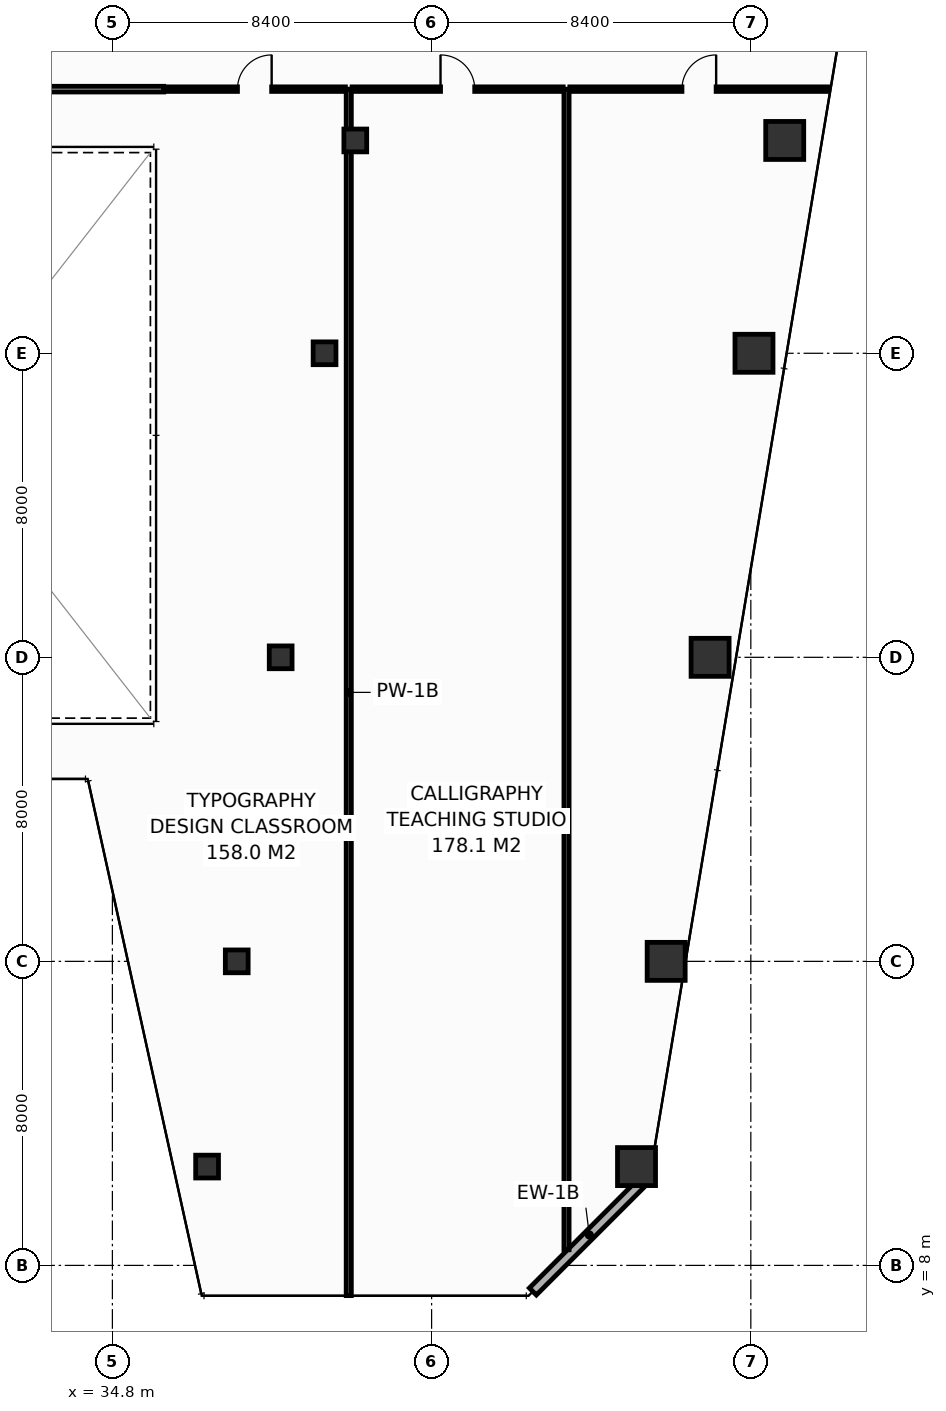
"""IFC4 building model, lengths in metres.
Left out: names, types, materials, properties, quantities, classifications, styles, units other than length and angle.
Written with IfcOpenShell. Run it as: python <this file> out.ifc"""

import sys

from ifc_helpers import new_model, si_unit, direction, frame, frame_2d, origin, origin_2d, place, context, subcontext, project, spatial, rectangle, hollow_rectangle, extrude, element, fill, save


model = new_model("IFC4")
c1 = context("Model", 3, precision=1e-05, world=origin(), true_north=direction((0.0, 1.0)))
c2 = subcontext(c1, "Body", "Model", "MODEL_VIEW")
j1 = project(units=[si_unit("LENGTHUNIT", "METRE"), si_unit("PLANEANGLEUNIT", "RADIAN")], contexts=[c1])
p1 = place(None, origin())
s1 = spatial("IfcSite", under=j1, at=p1, CompositionType="ELEMENT")
p2 = place(p1, origin())
s2 = spatial("IfcBuilding", under=s1, at=p2, CompositionType="ELEMENT")
p3 = place(p2, frame((0.0, 0.0, 133.4)))
s3 = spatial("IfcBuildingStorey", under=s2, at=p3, CompositionType="ELEMENT", Elevation=133.4)
p4 = place(p3, frame((48.592, 10.6, 0.0), z_axis=(0.0, 0.0, 1.0), x_axis=(1.0, 0.0, 0.0)))
e1 = element("IfcColumn", 1, at=p4, inside=s3, PredefinedType="COLUMN", context=c2, shape_type="SweptSolid", body=[
    extrude(hollow_rectangle(XDim=1.0, YDim=1.0, WallThickness=0.045, at=origin_2d()), origin(), (0.0, 0.0, 1.0), 3.8),
])
p5 = place(p3, frame((37.292, 10.6, 0.0), z_axis=(0.0, 0.0, 1.0), x_axis=(1.0, 0.0, 0.0)))
e2 = element("IfcColumn", 2, at=p5, inside=s3, PredefinedType="COLUMN", context=c2, shape_type="SweptSolid", body=[
    extrude(hollow_rectangle(XDim=0.6, YDim=0.6, WallThickness=0.028, at=origin_2d()), origin(), (0.0, 0.0, 1.0), 3.8),
])
p6 = place(p3, frame((49.372, 16.0, 0.0), z_axis=(0.0, 0.0, 1.0), x_axis=(1.0, 0.0, 0.0)))
e3 = element("IfcColumn", 3, at=p6, inside=s3, PredefinedType="COLUMN", context=c2, shape_type="SweptSolid", body=[
    extrude(hollow_rectangle(XDim=1.0, YDim=1.0, WallThickness=0.045, at=origin_2d()), origin(), (0.0, 0.0, 1.0), 3.8),
])
p7 = place(p3, frame((38.072, 16.0, 0.0), z_axis=(0.0, 0.0, 1.0), x_axis=(1.0, 0.0, 0.0)))
e4 = element("IfcColumn", 4, at=p7, inside=s3, PredefinedType="COLUMN", context=c2, shape_type="SweptSolid", body=[
    extrude(hollow_rectangle(XDim=0.6, YDim=0.6, WallThickness=0.028, at=origin_2d()), origin(), (0.0, 0.0, 1.0), 3.8),
])
p8 = place(p3, frame((50.528, 24.0, 0.0), z_axis=(0.0, 0.0, 1.0), x_axis=(1.0, 0.0, 0.0)))
e5 = element("IfcColumn", 5, at=p8, inside=s3, PredefinedType="COLUMN", context=c2, shape_type="SweptSolid", body=[
    extrude(hollow_rectangle(XDim=1.0, YDim=1.0, WallThickness=0.045, at=origin_2d()), origin(), (0.0, 0.0, 1.0), 3.8),
])
p9 = place(p3, frame((39.228, 24.0, 0.0), z_axis=(0.0, 0.0, 1.0), x_axis=(1.0, 0.0, 0.0)))
e6 = element("IfcColumn", 6, at=p9, inside=s3, PredefinedType="COLUMN", context=c2, shape_type="SweptSolid", body=[
    extrude(hollow_rectangle(XDim=0.6, YDim=0.6, WallThickness=0.028, at=origin_2d()), origin(), (0.0, 0.0, 1.0), 3.8),
])
p10 = place(p3, frame((51.683, 32.0, 0.0), z_axis=(0.0, 0.0, 1.0), x_axis=(1.0, 0.0, 0.0)))
e7 = element("IfcColumn", 7, at=p10, inside=s3, PredefinedType="COLUMN", context=c2, shape_type="SweptSolid", body=[
    extrude(hollow_rectangle(XDim=1.0, YDim=1.0, WallThickness=0.045, at=origin_2d()), origin(), (0.0, 0.0, 1.0), 3.8),
])
p11 = place(p3, frame((40.383, 32.0, 0.0), z_axis=(0.0, 0.0, 1.0), x_axis=(1.0, 0.0, 0.0)))
e8 = element("IfcColumn", 8, at=p11, inside=s3, PredefinedType="COLUMN", context=c2, shape_type="SweptSolid", body=[
    extrude(hollow_rectangle(XDim=0.6, YDim=0.6, WallThickness=0.028, at=origin_2d()), origin(), (0.0, 0.0, 1.0), 3.8),
])
p12 = place(p3, frame((52.492, 37.6, 0.0), z_axis=(0.0, 0.0, 1.0), x_axis=(1.0, 0.0, 0.0)))
e9 = element("IfcColumn", 9, at=p12, inside=s3, PredefinedType="COLUMN", context=c2, shape_type="SweptSolid", body=[
    extrude(hollow_rectangle(XDim=1.0, YDim=1.0, WallThickness=0.045, at=origin_2d()), origin(), (0.0, 0.0, 1.0), 3.8),
])
p13 = place(p3, frame((41.192, 37.6, 0.0), z_axis=(0.0, 0.0, 1.0), x_axis=(1.0, 0.0, 0.0)))
e10 = element("IfcColumn", 10, at=p13, inside=s3, PredefinedType="COLUMN", context=c2, shape_type="SweptSolid", body=[
    extrude(hollow_rectangle(XDim=0.6, YDim=0.6, WallThickness=0.028, at=origin_2d()), origin(), (0.0, 0.0, 1.0), 3.8),
])
p14 = place(p3, frame((45.864, 7.313, 0.0), z_axis=(0.0, 0.0, 1.0), x_axis=(0.70707775441, 0.707135806771, 0.0)))
e11 = element("IfcWall", 11, at=p14, inside=s3, PredefinedType="STANDARD", context=c2, shape_type="SweptSolid", body=[
    extrude(rectangle(XDim=4.206, YDim=0.26, at=frame_2d((2.103, 0.0))), origin(), (0.0, 0.0, 1.0), 3.55),
])
p15 = place(p3, frame((41.02, 7.205, 0.0), z_axis=(0.0, 0.0, 1.0), x_axis=(0.0, 1.0, 0.0)))
e12 = element("IfcWall", 12, at=p15, inside=s3, PredefinedType="PARTITIONING", context=c2, shape_type="SweptSolid", body=[
    extrude(rectangle(XDim=31.745, YDim=0.135, at=frame_2d((15.873, 0.0))), origin(), (0.0, 0.0, 1.0), 2.835),
])
p16 = place(p3, frame((46.75, 8.411, 0.0), z_axis=(0.0, 0.0, 1.0), x_axis=(0.0, 1.0, 0.0)))
e13 = element("IfcWall", 13, at=p16, inside=s3, PredefinedType="PARTITIONING", context=c2, shape_type="SweptSolid", body=[
    extrude(rectangle(XDim=30.539, YDim=0.135, at=frame_2d((15.27, 0.0))), origin(), (0.0, 0.0, 1.0), 2.835),
])
p17 = place(p3, frame((23.85, 38.95, 0.0), z_axis=(0.0, 0.0, 1.0), x_axis=(1.0, 0.0, 0.0)))
e14 = element("IfcWall", 14, at=p17, inside=s3, PredefinedType="PARTITIONING", context=c2, shape_type="SweptSolid", body=[
    extrude(rectangle(XDim=12.3, YDim=0.15, at=frame_2d((6.15, 0.0))), origin(), (0.0, 0.0, 1.0), 3.55),
])
p18 = place(p3, frame((36.15, 38.95, 0.0), z_axis=(0.0, 0.0, 1.0), x_axis=(1.0, 0.0, 0.0)))
e15 = element("IfcWall", 15, at=p18, inside=s3, PredefinedType="PARTITIONING", context=c2, shape_type="SweptSolid", body=[
    extrude(rectangle(XDim=4.783, YDim=0.12, at=frame_2d((2.391, 0.0))), origin(), (0.0, 0.0, 1.0), 2.835),
])
p19 = place(p18, frame((1.941, 0.0, 0.0)))
e16 = element("IfcOpeningElement", 16, at=p19, cuts=e15, PredefinedType="OPENING", context=c2, shape_type="SweptSolid", body=[
    extrude(rectangle(XDim=0.9, YDim=2.1, at=frame_2d((0.45, 1.05))), frame((0.0, 0.07, 0.0), z_axis=(0.0, -1.0, 0.0), x_axis=(1.0, 0.0, 0.0)), (0.0, 0.0, 1.0), 0.14),
])
p20 = place(p3, frame((41.107, 38.95, 0.0), z_axis=(0.0, 0.0, 1.0), x_axis=(1.0, 0.0, 0.0)))
e17 = element("IfcWall", 17, at=p20, inside=s3, PredefinedType="PARTITIONING", context=c2, shape_type="SweptSolid", body=[
    extrude(rectangle(XDim=5.555, YDim=0.12, at=frame_2d((2.778, 0.0))), origin(), (0.0, 0.0, 1.0), 3.55),
])
p21 = place(p20, frame((2.327, 0.0, 0.0)))
e18 = element("IfcOpeningElement", 18, at=p21, cuts=e17, PredefinedType="OPENING", context=c2, shape_type="SweptSolid", body=[
    extrude(rectangle(XDim=0.9, YDim=2.1, at=frame_2d((0.45, 1.05))), frame((0.0, 0.07, 0.0), z_axis=(0.0, -1.0, 0.0), x_axis=(1.0, 0.0, 0.0)), (0.0, 0.0, 1.0), 0.14),
])
p22 = place(p3, frame((46.837, 38.95, 0.0), z_axis=(0.0, 0.0, 1.0), x_axis=(1.0, 0.0, 0.0)))
e19 = element("IfcWall", 19, at=p22, inside=s3, PredefinedType="PARTITIONING", context=c2, shape_type="SweptSolid", body=[
    extrude(rectangle(XDim=6.8, YDim=0.12, at=frame_2d((3.4, 0.0))), origin(), (0.0, 0.0, 1.0), 3.035),
])
p23 = place(p22, frame((2.95, 0.0, 0.0)))
e20 = element("IfcOpeningElement", 20, at=p23, cuts=e19, PredefinedType="OPENING", context=c2, shape_type="SweptSolid", body=[
    extrude(rectangle(XDim=0.9, YDim=2.1, at=frame_2d((0.45, 1.05))), frame((0.0, 0.07, 0.0), z_axis=(0.0, -1.0, 0.0), x_axis=(1.0, 0.0, 0.0)), (0.0, 0.0, 1.0), 0.14),
])
p24 = place(p19, origin())
e21 = element("IfcDoor", 21, at=p24, inside=s3, OperationType="SINGLE_SWING_RIGHT", PredefinedType="DOOR", context=c2, shape_type="SweptSolid", body=[
    extrude(rectangle(XDim=0.9, YDim=2.1, at=frame_2d((0.45, 1.05))), frame((0.0, 0.025, 0.0), z_axis=(0.0, -1.0, 0.0), x_axis=(1.0, 0.0, 0.0)), (0.0, 0.0, 1.0), 0.05),
])
fill(e16, e21)
p25 = place(p21, origin())
e22 = element("IfcDoor", 22, at=p25, inside=s3, OperationType="SINGLE_SWING_LEFT", PredefinedType="DOOR", context=c2, shape_type="SweptSolid", body=[
    extrude(rectangle(XDim=0.9, YDim=2.1, at=frame_2d((0.45, 1.05))), frame((0.0, 0.025, 0.0), z_axis=(0.0, -1.0, 0.0), x_axis=(1.0, 0.0, 0.0)), (0.0, 0.0, 1.0), 0.05),
])
fill(e18, e22)
p26 = place(p23, origin())
e23 = element("IfcDoor", 23, at=p26, inside=s3, OperationType="SINGLE_SWING_RIGHT", PredefinedType="DOOR", context=c2, shape_type="SweptSolid", body=[
    extrude(rectangle(XDim=0.9, YDim=2.1, at=frame_2d((0.45, 1.05))), frame((0.0, 0.025, 0.0), z_axis=(0.0, -1.0, 0.0), x_axis=(1.0, 0.0, 0.0)), (0.0, 0.0, 1.0), 0.05),
])
fill(e20, e23)
save(model, sys.argv[1])
